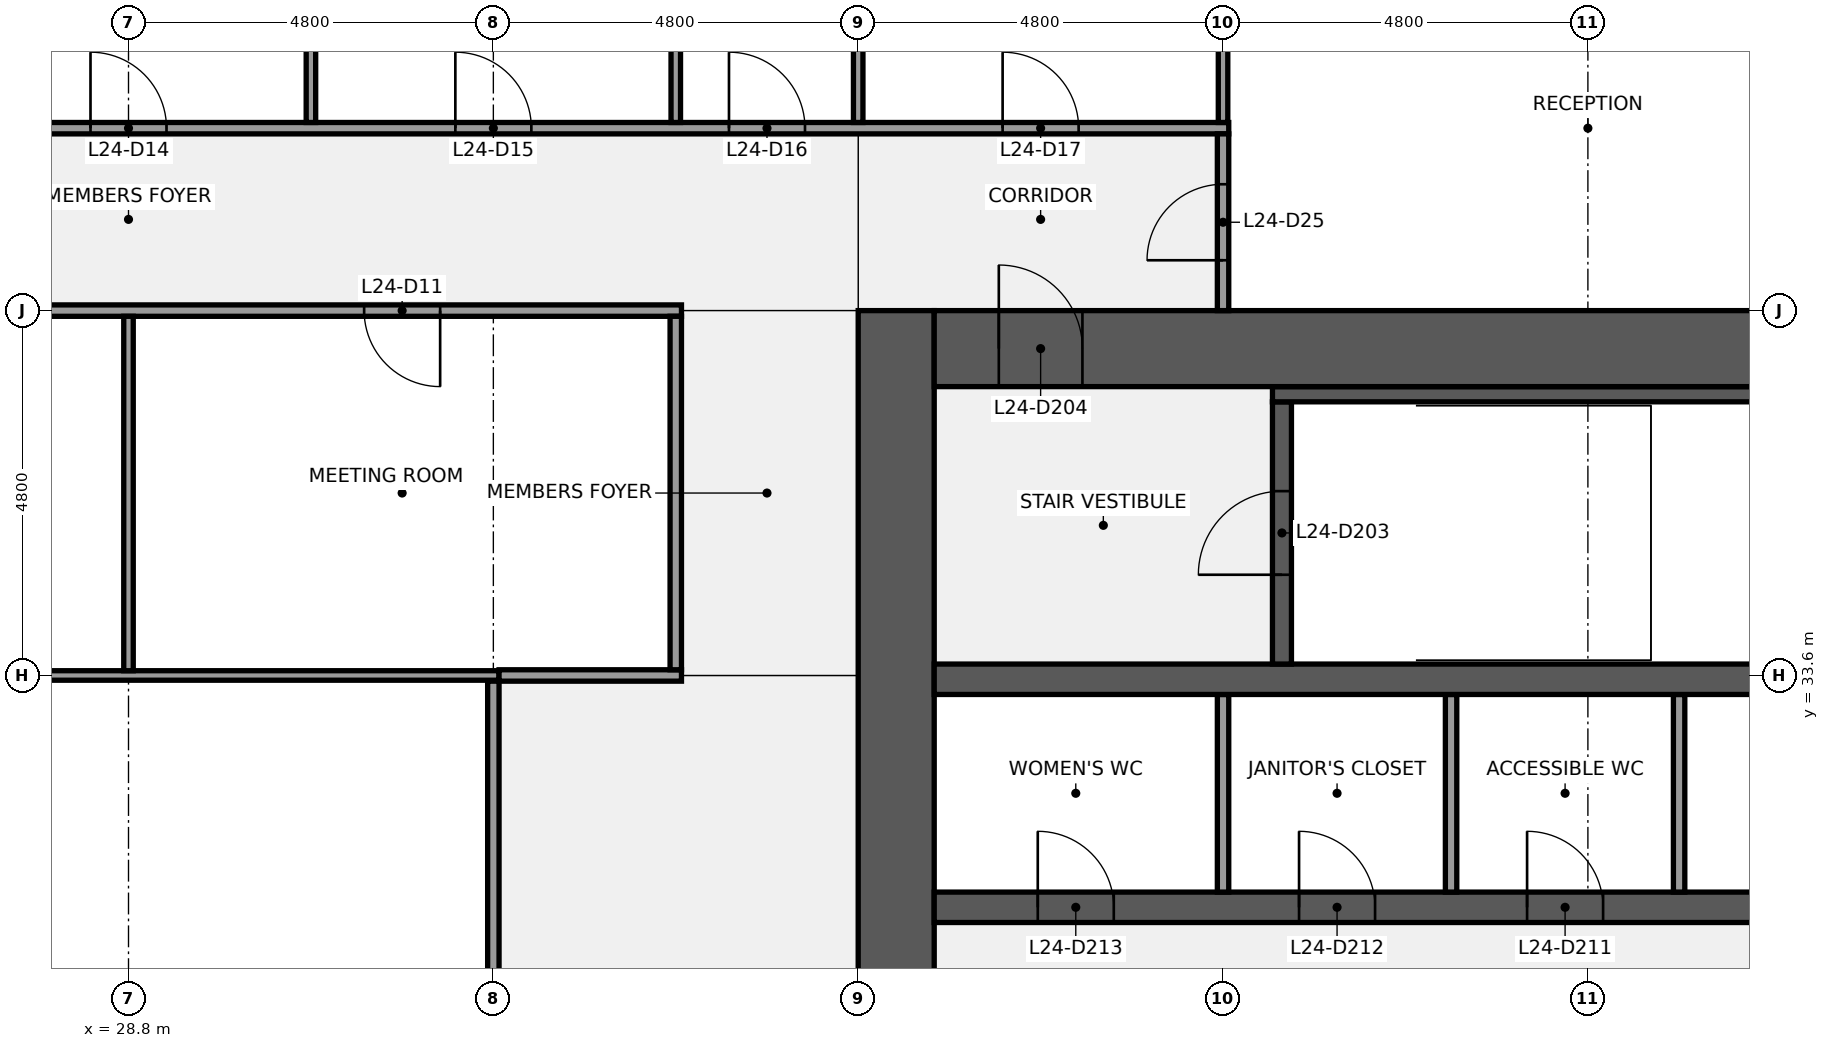
"""IFC4 building model, lengths in metres.
Left out: names, types, materials, properties, quantities, classifications, styles, units other than length and angle.
Written with IfcOpenShell. Run it as: python <this file> out.ifc"""

import sys

from ifc_helpers import new_model, si_unit, direction, frame, frame_2d, origin, place, context, subcontext, project, spatial, rectangle, extrude, element, fill, save


model = new_model("IFC4")
c1 = context("Model", 3, precision=1e-05, world=origin(), true_north=direction((0.0, 1.0)))
c2 = subcontext(c1, "Body", "Model", "MODEL_VIEW")
j1 = project(units=[si_unit("LENGTHUNIT", "METRE"), si_unit("PLANEANGLEUNIT", "RADIAN")], contexts=[c1])
p1 = place(None, origin())
s1 = spatial("IfcSite", under=j1, at=p1, CompositionType="ELEMENT")
p2 = place(p1, origin())
s2 = spatial("IfcBuilding", under=s1, at=p2, CompositionType="ELEMENT")
p3 = place(p2, frame((0.0, 0.0, 116.1)))
s3 = spatial("IfcBuildingStorey", under=s2, at=p3, CompositionType="ELEMENT", Elevation=116.1)
p4 = place(p3, frame((38.9, 9.6, 0.0), z_axis=(0.0, 0.0, 1.0), x_axis=(0.0, 1.0, 0.0)))
e1 = element("IfcWall", 1, at=p4, inside=s3, PredefinedType="SHEAR", context=c2, shape_type="SweptSolid", body=[
    extrude(rectangle(XDim=28.8, YDim=1.0, at=frame_2d((14.4, 0.0))), origin(), (0.0, 0.0, 1.0), 3.84),
])
p5 = place(p4, frame((8.7, 0.0, 0.0)))
e2 = element("IfcOpeningElement", 2, at=p5, cuts=e1, PredefinedType="OPENING", context=c2, shape_type="SweptSolid", body=[
    extrude(rectangle(XDim=1.8, YDim=2.1, at=frame_2d((0.9, 1.05))), frame((0.0, 0.51, 0.0), z_axis=(0.0, -1.0, 0.0), x_axis=(1.0, 0.0, 0.0)), (0.0, 0.0, 1.0), 1.02),
])
p6 = place(p4, frame((18.3, 0.0, 0.0)))
e3 = element("IfcOpeningElement", 3, at=p6, cuts=e1, PredefinedType="OPENING", context=c2, shape_type="SweptSolid", body=[
    extrude(rectangle(XDim=1.8, YDim=2.1, at=frame_2d((0.9, 1.05))), frame((0.0, 0.51, 0.0), z_axis=(0.0, -1.0, 0.0), x_axis=(1.0, 0.0, 0.0)), (0.0, 0.0, 1.0), 1.02),
])
p7 = place(p3, frame((39.4, 30.55, 0.0), z_axis=(0.0, 0.0, 1.0), x_axis=(1.0, 0.0, 0.0)))
e4 = element("IfcWall", 4, at=p7, inside=s3, PredefinedType="SHEAR", context=c2, shape_type="SweptSolid", body=[
    extrude(rectangle(XDim=17.2, YDim=0.4, at=frame_2d((8.6, 0.0))), origin(), (0.0, 0.0, 1.0), 3.84),
])
p8 = place(p7, frame((15.438, 0.0, 0.0)))
e5 = element("IfcOpeningElement", 5, at=p8, cuts=e4, PredefinedType="OPENING", context=c2, shape_type="SweptSolid", body=[
    extrude(rectangle(XDim=1.0, YDim=2.1, at=frame_2d((0.5, 1.05))), frame((0.0, 0.21, 0.0), z_axis=(0.0, -1.0, 0.0), x_axis=(1.0, 0.0, 0.0)), (0.0, 0.0, 1.0), 0.42),
])
p9 = place(p7, frame((11.7, 0.0, 0.0)))
e6 = element("IfcOpeningElement", 6, at=p9, cuts=e4, PredefinedType="OPENING", context=c2, shape_type="SweptSolid", body=[
    extrude(rectangle(XDim=1.0, YDim=2.1, at=frame_2d((0.5, 1.05))), frame((0.0, 0.21, 0.0), z_axis=(0.0, -1.0, 0.0), x_axis=(1.0, 0.0, 0.0)), (0.0, 0.0, 1.0), 0.42),
])
p10 = place(p7, frame((7.8, 0.0, 0.0)))
e7 = element("IfcOpeningElement", 7, at=p10, cuts=e4, PredefinedType="OPENING", context=c2, shape_type="SweptSolid", body=[
    extrude(rectangle(XDim=1.0, YDim=2.1, at=frame_2d((0.5, 1.05))), frame((0.0, 0.21, 0.0), z_axis=(0.0, -1.0, 0.0), x_axis=(1.0, 0.0, 0.0)), (0.0, 0.0, 1.0), 0.42),
])
p11 = place(p7, frame((4.8, 0.0, 0.0)))
e8 = element("IfcOpeningElement", 8, at=p11, cuts=e4, PredefinedType="OPENING", context=c2, shape_type="SweptSolid", body=[
    extrude(rectangle(XDim=1.0, YDim=2.1, at=frame_2d((0.5, 1.05))), frame((0.0, 0.21, 0.0), z_axis=(0.0, -1.0, 0.0), x_axis=(1.0, 0.0, 0.0)), (0.0, 0.0, 1.0), 0.42),
])
p12 = place(p7, frame((1.363, 0.0, 0.0)))
e9 = element("IfcOpeningElement", 9, at=p12, cuts=e4, PredefinedType="OPENING", context=c2, shape_type="SweptSolid", body=[
    extrude(rectangle(XDim=1.0, YDim=2.1, at=frame_2d((0.5, 1.05))), frame((0.0, 0.21, 0.0), z_axis=(0.0, -1.0, 0.0), x_axis=(1.0, 0.0, 0.0)), (0.0, 0.0, 1.0), 0.42),
])
for number, where, z_axis, x_axis in (
    (10, (49.2, 30.75, 0.0), (0.0, 0.0, 1.0), (0.0, 1.0, 0.0)),
    (11, (46.2, 30.75, 0.0), (0.0, 0.0, 1.0), (0.0, 1.0, 0.0)),
    (12, (43.2, 30.75, 0.0), (0.0, 0.0, 1.0), (0.0, 1.0, 0.0)),
):
    element("IfcWall", number, at=place(p3, frame(where, z_axis=z_axis, x_axis=x_axis)), inside=s3, PredefinedType="PARTITIONING", context=c2, shape_type="SweptSolid", body=[
        extrude(rectangle(XDim=2.6, YDim=0.15, at=frame_2d((1.3, 0.0))), origin(), (0.0, 0.0, 1.0), 3.84),
    ])
p13 = place(p3, frame((39.4, 33.55, 0.0), z_axis=(0.0, 0.0, 1.0), x_axis=(1.0, 0.0, 0.0)))
e13 = element("IfcWall", 13, at=p13, inside=s3, PredefinedType="SHEAR", context=c2, shape_type="SweptSolid", body=[
    extrude(rectangle(XDim=17.2, YDim=0.4, at=frame_2d((8.6, 0.0))), origin(), (0.0, 0.0, 1.0), 3.84),
])
p14 = place(p3, frame((43.975, 33.75, 0.0), z_axis=(0.0, 0.0, 1.0), x_axis=(0.0, 1.0, 0.0)))
e14 = element("IfcWall", 14, at=p14, inside=s3, PredefinedType="SHEAR", context=c2, shape_type="SweptSolid", body=[
    extrude(rectangle(XDim=3.45, YDim=0.25, at=frame_2d((1.725, 0.0))), origin(), (0.0, 0.0, 1.0), 3.84),
])
p15 = place(p14, frame((1.175, 0.0, 0.0)))
e15 = element("IfcOpeningElement", 15, at=p15, cuts=e14, PredefinedType="OPENING", context=c2, shape_type="SweptSolid", body=[
    extrude(rectangle(XDim=1.1, YDim=2.1, at=frame_2d((0.55, 1.05))), frame((0.0, 0.135, 0.0), z_axis=(0.0, -1.0, 0.0), x_axis=(1.0, 0.0, 0.0)), (0.0, 0.0, 1.0), 0.27),
])
p16 = place(p3, frame((43.85, 37.3, 0.0), z_axis=(0.0, 0.0, 1.0), x_axis=(1.0, 0.0, 0.0)))
e16 = element("IfcWall", 16, at=p16, inside=s3, PredefinedType="SHEAR", context=c2, shape_type="SweptSolid", body=[
    extrude(rectangle(XDim=7.5, YDim=0.2, at=frame_2d((3.75, 0.0))), origin(), (0.0, 0.0, 1.0), 3.84),
])
p17 = place(p3, frame((39.4, 37.9, 0.0), z_axis=(0.0, 0.0, 1.0), x_axis=(1.0, 0.0, 0.0)))
e17 = element("IfcWall", 17, at=p17, inside=s3, PredefinedType="SHEAR", context=c2, shape_type="SweptSolid", body=[
    extrude(rectangle(XDim=13.4, YDim=1.0, at=frame_2d((6.7, 0.0))), origin(), (0.0, 0.0, 1.0), 3.84),
])
p18 = place(p17, frame((0.85, 0.0, 0.0)))
e18 = element("IfcOpeningElement", 18, at=p18, cuts=e17, PredefinedType="OPENING", context=c2, shape_type="SweptSolid", body=[
    extrude(rectangle(XDim=1.1, YDim=2.1, at=frame_2d((0.55, 1.05))), frame((0.0, 0.51, 0.0), z_axis=(0.0, -1.0, 0.0), x_axis=(1.0, 0.0, 0.0)), (0.0, 0.0, 1.0), 1.02),
])
p19 = place(p3, frame((24.075, 33.6, 0.0), z_axis=(0.0, 0.0, 1.0), x_axis=(1.0, 0.0, 0.0)))
e19 = element("IfcWall", 19, at=p19, inside=s3, PredefinedType="PARTITIONING", context=c2, shape_type="SweptSolid", body=[
    extrude(rectangle(XDim=9.6, YDim=0.125, at=frame_2d((4.8, 0.0))), origin(), (0.0, 0.0, 1.0), 2.936),
])
p20 = place(p3, frame((33.675, 33.6, 0.0), z_axis=(0.0, 0.0, 1.0), x_axis=(1.0, 0.0, 0.0)))
e20 = element("IfcWall", 20, at=p20, inside=s3, PredefinedType="PARTITIONING", context=c2, shape_type="SweptSolid", body=[
    extrude(rectangle(XDim=2.4, YDim=0.15, at=frame_2d((1.2, 0.0))), origin(), (0.0, 0.0, 1.0), 2.936),
])
p21 = place(p3, frame((21.525, 38.4, 0.0), z_axis=(0.0, 0.0, 1.0), x_axis=(1.0, 0.0, 0.0)))
e21 = element("IfcWall", 21, at=p21, inside=s3, PredefinedType="PARTITIONING", context=c2, shape_type="SweptSolid", body=[
    extrude(rectangle(XDim=14.55, YDim=0.15, at=frame_2d((7.275, 0.0))), origin(), (0.0, 0.0, 1.0), 2.936),
])
p22 = place(p21, frame((3.175, 0.0, 0.0)))
e22 = element("IfcOpeningElement", 22, at=p22, cuts=e21, PredefinedType="OPENING", context=c2, shape_type="SweptSolid", body=[
    extrude(rectangle(XDim=1.0, YDim=2.1, at=frame_2d((0.5, 1.05))), frame((0.0, 0.085, 0.0), z_axis=(0.0, -1.0, 0.0), x_axis=(1.0, 0.0, 0.0)), (0.0, 0.0, 1.0), 0.17),
])
p23 = place(p21, frame((10.375, 0.0, 0.0)))
e23 = element("IfcOpeningElement", 23, at=p23, cuts=e21, PredefinedType="OPENING", context=c2, shape_type="SweptSolid", body=[
    extrude(rectangle(XDim=1.0, YDim=2.1, at=frame_2d((0.5, 1.05))), frame((0.0, 0.085, 0.0), z_axis=(0.0, -1.0, 0.0), x_axis=(1.0, 0.0, 0.0)), (0.0, 0.0, 1.0), 0.17),
])
p24 = place(p3, frame((14.325, 40.8, 0.0), z_axis=(0.0, 0.0, 1.0), x_axis=(1.0, 0.0, 0.0)))
e24 = element("IfcWall", 24, at=p24, inside=s3, PredefinedType="PARTITIONING", context=c2, shape_type="SweptSolid", body=[
    extrude(rectangle(XDim=28.95, YDim=0.15, at=frame_2d((14.475, 0.0))), origin(), (0.0, 0.0, 1.0), 2.936),
])
p25 = place(p24, frame((2.575, 0.0, 0.0)))
e25 = element("IfcOpeningElement", 25, at=p25, cuts=e24, PredefinedType="OPENING", context=c2, shape_type="SweptSolid", body=[
    extrude(rectangle(XDim=1.0, YDim=2.1, at=frame_2d((0.5, 1.05))), frame((0.0, 0.085, 0.0), z_axis=(0.0, -1.0, 0.0), x_axis=(1.0, 0.0, 0.0)), (0.0, 0.0, 1.0), 0.17),
])
p26 = place(p24, frame((7.975, 0.0, 0.0)))
e26 = element("IfcOpeningElement", 26, at=p26, cuts=e24, PredefinedType="OPENING", context=c2, shape_type="SweptSolid", body=[
    extrude(rectangle(XDim=1.0, YDim=2.1, at=frame_2d((0.5, 1.05))), frame((0.0, 0.085, 0.0), z_axis=(0.0, -1.0, 0.0), x_axis=(1.0, 0.0, 0.0)), (0.0, 0.0, 1.0), 0.17),
])
p27 = place(p24, frame((13.975, 0.0, 0.0)))
e27 = element("IfcOpeningElement", 27, at=p27, cuts=e24, PredefinedType="OPENING", context=c2, shape_type="SweptSolid", body=[
    extrude(rectangle(XDim=1.0, YDim=2.1, at=frame_2d((0.5, 1.05))), frame((0.0, 0.085, 0.0), z_axis=(0.0, -1.0, 0.0), x_axis=(1.0, 0.0, 0.0)), (0.0, 0.0, 1.0), 0.17),
])
p28 = place(p24, frame((18.775, 0.0, 0.0)))
e28 = element("IfcOpeningElement", 28, at=p28, cuts=e24, PredefinedType="OPENING", context=c2, shape_type="SweptSolid", body=[
    extrude(rectangle(XDim=1.0, YDim=2.1, at=frame_2d((0.5, 1.05))), frame((0.0, 0.085, 0.0), z_axis=(0.0, -1.0, 0.0), x_axis=(1.0, 0.0, 0.0)), (0.0, 0.0, 1.0), 0.17),
])
p29 = place(p24, frame((22.375, 0.0, 0.0)))
e29 = element("IfcOpeningElement", 29, at=p29, cuts=e24, PredefinedType="OPENING", context=c2, shape_type="SweptSolid", body=[
    extrude(rectangle(XDim=1.0, YDim=2.1, at=frame_2d((0.5, 1.05))), frame((0.0, 0.085, 0.0), z_axis=(0.0, -1.0, 0.0), x_axis=(1.0, 0.0, 0.0)), (0.0, 0.0, 1.0), 0.17),
])
p30 = place(p24, frame((25.975, 0.0, 0.0)))
e30 = element("IfcOpeningElement", 30, at=p30, cuts=e24, PredefinedType="OPENING", context=c2, shape_type="SweptSolid", body=[
    extrude(rectangle(XDim=1.0, YDim=2.1, at=frame_2d((0.5, 1.05))), frame((0.0, 0.085, 0.0), z_axis=(0.0, -1.0, 0.0), x_axis=(1.0, 0.0, 0.0)), (0.0, 0.0, 1.0), 0.17),
])
p31 = place(p3, frame((28.8, 33.663, 0.0), z_axis=(0.0, 0.0, 1.0), x_axis=(0.0, 1.0, 0.0)))
e31 = element("IfcWall", 31, at=p31, inside=s3, PredefinedType="PARTITIONING", context=c2, shape_type="SweptSolid", body=[
    extrude(rectangle(XDim=4.662, YDim=0.125, at=frame_2d((2.331, 0.0))), origin(), (0.0, 0.0, 1.0), 2.936),
])
p32 = place(p3, frame((31.2, 40.875, 0.0), z_axis=(0.0, 0.0, 1.0), x_axis=(0.0, 1.0, 0.0)))
e32 = element("IfcWall", 32, at=p32, inside=s3, PredefinedType="PARTITIONING", context=c2, shape_type="SweptSolid", body=[
    extrude(rectangle(XDim=7.025, YDim=0.125, at=frame_2d((3.512, 0.0))), origin(), (0.0, 0.0, 1.0), 2.936),
])
p33 = place(p3, frame((33.6, 20.475, 0.0), z_axis=(0.0, 0.0, 1.0), x_axis=(0.0, 1.0, 0.0)))
e33 = element("IfcWall", 33, at=p33, inside=s3, PredefinedType="PARTITIONING", context=c2, shape_type="SweptSolid", body=[
    extrude(rectangle(XDim=13.05, YDim=0.15, at=frame_2d((6.525, 0.0))), origin(), (0.0, 0.0, 1.0), 2.936),
])
p34 = place(p3, frame((36.0, 40.875, 0.0), z_axis=(0.0, 0.0, 1.0), x_axis=(0.0, 1.0, 0.0)))
e34 = element("IfcWall", 34, at=p34, inside=s3, PredefinedType="PARTITIONING", context=c2, shape_type="SweptSolid", body=[
    extrude(rectangle(XDim=7.025, YDim=0.125, at=frame_2d((3.512, 0.0))), origin(), (0.0, 0.0, 1.0), 2.936),
])
p35 = place(p3, frame((36.0, 33.675, 0.0), z_axis=(0.0, 0.0, 1.0), x_axis=(0.0, 1.0, 0.0)))
e35 = element("IfcWall", 35, at=p35, inside=s3, PredefinedType="PARTITIONING", context=c2, shape_type="SweptSolid", body=[
    extrude(rectangle(XDim=4.65, YDim=0.15, at=frame_2d((2.325, 0.0))), origin(), (0.0, 0.0, 1.0), 2.936),
])
p36 = place(p3, frame((38.4, 40.875, 0.0), z_axis=(0.0, 0.0, 1.0), x_axis=(0.0, 1.0, 0.0)))
e36 = element("IfcWall", 36, at=p36, inside=s3, PredefinedType="PARTITIONING", context=c2, shape_type="SweptSolid", body=[
    extrude(rectangle(XDim=6.525, YDim=0.125, at=frame_2d((3.262, 0.0))), origin(), (0.0, 0.0, 1.0), 2.936),
])
p37 = place(p3, frame((43.2, 40.875, 0.0), z_axis=(0.0, 0.0, 1.0), x_axis=(0.0, 1.0, 0.0)))
e37 = element("IfcWall", 37, at=p37, inside=s3, PredefinedType="PARTITIONING", context=c2, shape_type="SweptSolid", body=[
    extrude(rectangle(XDim=2.225, YDim=0.125, at=frame_2d((1.113, 0.0))), origin(), (0.0, 0.0, 1.0), 2.936),
])
p38 = place(p3, frame((43.2, 38.4, 0.0), z_axis=(0.0, 0.0, 1.0), x_axis=(0.0, 1.0, 0.0)))
e38 = element("IfcWall", 38, at=p38, inside=s3, PredefinedType="PARTITIONING", context=c2, shape_type="SweptSolid", body=[
    extrude(rectangle(XDim=2.325, YDim=0.15, at=frame_2d((1.163, 0.0))), origin(), (0.0, 0.0, 1.0), 2.936),
])
p39 = place(p38, frame((0.663, 0.0, 0.0)))
e39 = element("IfcOpeningElement", 39, at=p39, cuts=e38, PredefinedType="OPENING", context=c2, shape_type="SweptSolid", body=[
    extrude(rectangle(XDim=1.0, YDim=2.1, at=frame_2d((0.5, 1.05))), frame((0.0, 0.085, 0.0), z_axis=(0.0, -1.0, 0.0), x_axis=(1.0, 0.0, 0.0)), (0.0, 0.0, 1.0), 0.17),
])
p40 = place(p15, origin())
e40 = element("IfcDoor", 40, at=p40, inside=s3, OperationType="SINGLE_SWING_LEFT", PredefinedType="DOOR", context=c2, shape_type="SweptSolid", body=[
    extrude(rectangle(XDim=1.1, YDim=2.1, at=frame_2d((0.55, 1.05))), frame((0.0, 0.025, 0.0), z_axis=(0.0, -1.0, 0.0), x_axis=(1.0, 0.0, 0.0)), (0.0, 0.0, 1.0), 0.05),
])
fill(e15, e40)
p41 = place(p18, origin())
e41 = element("IfcDoor", 41, at=p41, inside=s3, OperationType="SINGLE_SWING_LEFT", PredefinedType="DOOR", context=c2, shape_type="SweptSolid", body=[
    extrude(rectangle(XDim=1.1, YDim=2.1, at=frame_2d((0.55, 1.05))), frame((0.0, 0.025, 0.0), z_axis=(0.0, -1.0, 0.0), x_axis=(1.0, 0.0, 0.0)), (0.0, 0.0, 1.0), 0.05),
])
fill(e18, e41)
p42 = place(p10, origin())
e42 = element("IfcDoor", 42, at=p42, inside=s3, OperationType="SINGLE_SWING_LEFT", PredefinedType="DOOR", context=c2, shape_type="SweptSolid", body=[
    extrude(rectangle(XDim=1.0, YDim=2.1, at=frame_2d((0.5, 1.05))), frame((0.0, 0.025, 0.0), z_axis=(0.0, -1.0, 0.0), x_axis=(1.0, 0.0, 0.0)), (0.0, 0.0, 1.0), 0.05),
])
fill(e7, e42)
p43 = place(p11, origin())
e43 = element("IfcDoor", 43, at=p43, inside=s3, OperationType="SINGLE_SWING_LEFT", PredefinedType="DOOR", context=c2, shape_type="SweptSolid", body=[
    extrude(rectangle(XDim=1.0, YDim=2.1, at=frame_2d((0.5, 1.05))), frame((0.0, 0.025, 0.0), z_axis=(0.0, -1.0, 0.0), x_axis=(1.0, 0.0, 0.0)), (0.0, 0.0, 1.0), 0.05),
])
fill(e8, e43)
p44 = place(p12, origin())
e44 = element("IfcDoor", 44, at=p44, inside=s3, OperationType="SINGLE_SWING_LEFT", PredefinedType="DOOR", context=c2, shape_type="SweptSolid", body=[
    extrude(rectangle(XDim=1.0, YDim=2.1, at=frame_2d((0.5, 1.05))), frame((0.0, 0.025, 0.0), z_axis=(0.0, -1.0, 0.0), x_axis=(1.0, 0.0, 0.0)), (0.0, 0.0, 1.0), 0.05),
])
fill(e9, e44)
p45 = place(p23, origin())
e45 = element("IfcDoor", 45, at=p45, inside=s3, OperationType="SINGLE_SWING_RIGHT", PredefinedType="DOOR", context=c2, shape_type="SweptSolid", body=[
    extrude(rectangle(XDim=1.0, YDim=2.1, at=frame_2d((0.5, 1.05))), frame((0.0, 0.025, 0.0), z_axis=(0.0, -1.0, 0.0), x_axis=(1.0, 0.0, 0.0)), (0.0, 0.0, 1.0), 0.05),
])
fill(e23, e45)
p46 = place(p27, origin())
e46 = element("IfcDoor", 46, at=p46, inside=s3, OperationType="SINGLE_SWING_LEFT", PredefinedType="DOOR", context=c2, shape_type="SweptSolid", body=[
    extrude(rectangle(XDim=1.0, YDim=2.1, at=frame_2d((0.5, 1.05))), frame((0.0, 0.025, 0.0), z_axis=(0.0, -1.0, 0.0), x_axis=(1.0, 0.0, 0.0)), (0.0, 0.0, 1.0), 0.05),
])
fill(e27, e46)
p47 = place(p28, origin())
e47 = element("IfcDoor", 47, at=p47, inside=s3, OperationType="SINGLE_SWING_LEFT", PredefinedType="DOOR", context=c2, shape_type="SweptSolid", body=[
    extrude(rectangle(XDim=1.0, YDim=2.1, at=frame_2d((0.5, 1.05))), frame((0.0, 0.025, 0.0), z_axis=(0.0, -1.0, 0.0), x_axis=(1.0, 0.0, 0.0)), (0.0, 0.0, 1.0), 0.05),
])
fill(e28, e47)
p48 = place(p29, origin())
e48 = element("IfcDoor", 48, at=p48, inside=s3, OperationType="SINGLE_SWING_LEFT", PredefinedType="DOOR", context=c2, shape_type="SweptSolid", body=[
    extrude(rectangle(XDim=1.0, YDim=2.1, at=frame_2d((0.5, 1.05))), frame((0.0, 0.025, 0.0), z_axis=(0.0, -1.0, 0.0), x_axis=(1.0, 0.0, 0.0)), (0.0, 0.0, 1.0), 0.05),
])
fill(e29, e48)
p49 = place(p30, origin())
e49 = element("IfcDoor", 49, at=p49, inside=s3, OperationType="SINGLE_SWING_LEFT", PredefinedType="DOOR", context=c2, shape_type="SweptSolid", body=[
    extrude(rectangle(XDim=1.0, YDim=2.1, at=frame_2d((0.5, 1.05))), frame((0.0, 0.025, 0.0), z_axis=(0.0, -1.0, 0.0), x_axis=(1.0, 0.0, 0.0)), (0.0, 0.0, 1.0), 0.05),
])
fill(e30, e49)
p50 = place(p39, origin())
e50 = element("IfcDoor", 50, at=p50, inside=s3, OperationType="SINGLE_SWING_LEFT", PredefinedType="DOOR", context=c2, shape_type="SweptSolid", body=[
    extrude(rectangle(XDim=1.0, YDim=2.1, at=frame_2d((0.5, 1.05))), frame((0.0, 0.025, 0.0), z_axis=(0.0, -1.0, 0.0), x_axis=(1.0, 0.0, 0.0)), (0.0, 0.0, 1.0), 0.05),
])
fill(e39, e50)
save(model, sys.argv[1])
